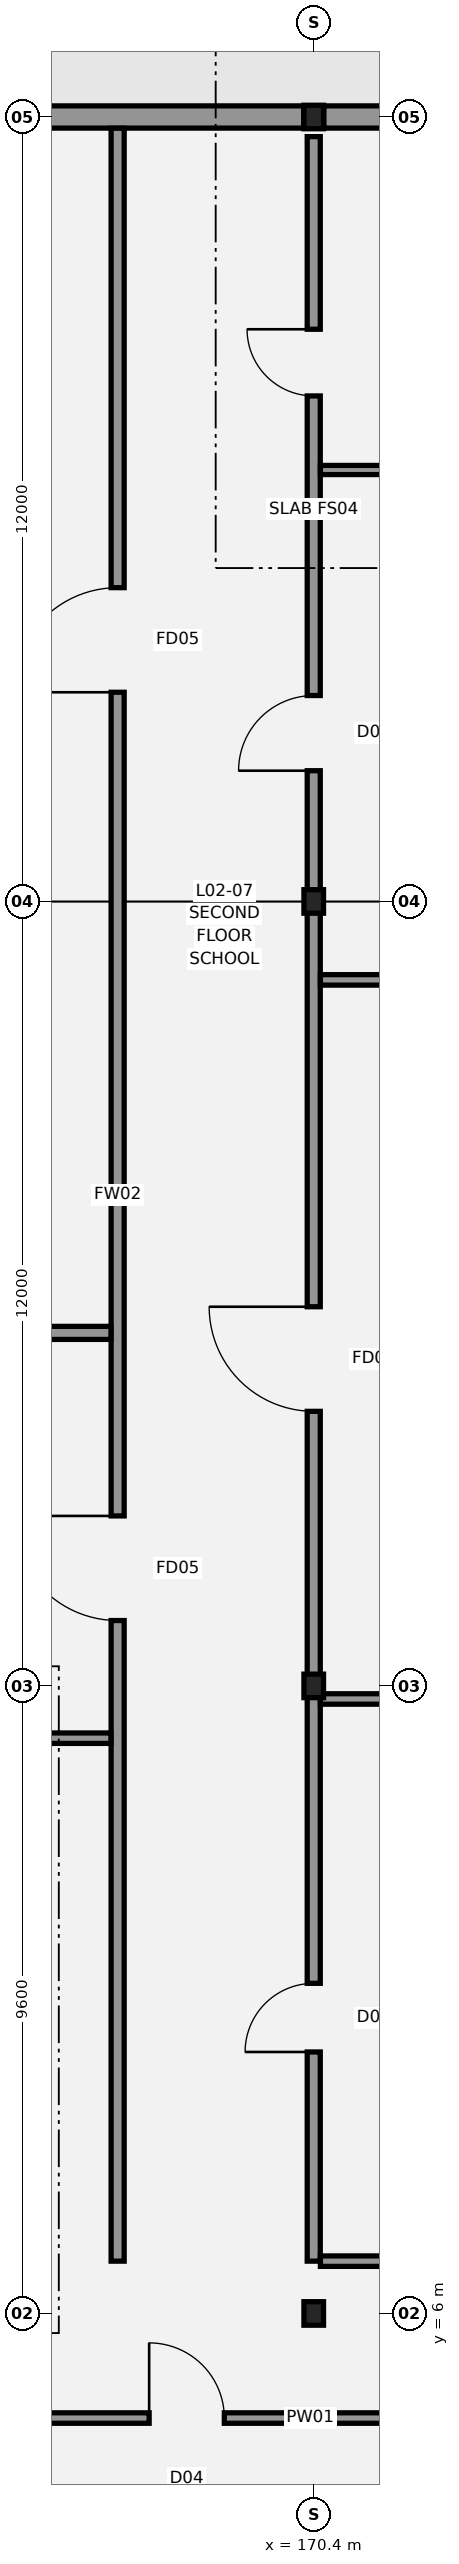
"""IFC4 building model, lengths in metres.
Left out: names, types, materials, properties, quantities, classifications, styles, units other than length and angle.
Written with IfcOpenShell. Run it as: python <this file> out.ifc"""

import sys

from ifc_helpers import new_model, si_unit, direction, frame, frame_2d, origin, origin_2d, place, context, subcontext, project, spatial, rectangle, i_section, extrude, element, fill, save


model = new_model("IFC4")
c1 = context("Model", 3, precision=1e-05, world=origin(), true_north=direction((0.0, 1.0)))
c2 = subcontext(c1, "Body", "Model", "MODEL_VIEW")
j1 = project(units=[si_unit("LENGTHUNIT", "METRE"), si_unit("PLANEANGLEUNIT", "RADIAN")], contexts=[c1])
p1 = place(None, origin())
s1 = spatial("IfcSite", under=j1, at=p1, CompositionType="ELEMENT")
p2 = place(p1, origin())
s2 = spatial("IfcBuilding", under=s1, at=p2, CompositionType="ELEMENT")
p3 = place(p2, frame((0.0, 0.0, 10.2)))
s3 = spatial("IfcBuildingStorey", under=s2, at=p3, CompositionType="ELEMENT", Elevation=10.2)
for number, where, z_axis, x_axis in (
    (1, (170.4, 6.0, 0.0), (0.0, 0.0, 1.0), (1.0, 0.0, 0.0)),
    (2, (170.4, 15.6, 0.0), (0.0, 0.0, 1.0), (1.0, 0.0, 0.0)),
    (3, (170.4, 27.6, 0.0), (0.0, 0.0, 1.0), (1.0, 0.0, 0.0)),
    (4, (170.4, 39.6, 0.0), (0.0, 0.0, 1.0), (1.0, 0.0, 0.0)),
):
    element("IfcColumn", number, at=place(p3, frame(where, z_axis=z_axis, x_axis=x_axis)), inside=s3, PredefinedType="COLUMN", context=c2, shape_type="SweptSolid", body=[
        extrude(i_section(OverallWidth=0.3, OverallDepth=0.36, WebThickness=0.012, FlangeThickness=0.022, FilletRadius=0.027, at=origin_2d()), origin(), (0.0, 0.0, 1.0), 4.2),
    ])
p4 = place(p3, frame((159.754, 39.6, 0.0), z_axis=(0.0, 0.0, 1.0), x_axis=(1.0, 0.0, 0.0)))
e5 = element("IfcWall", 5, at=p4, inside=s3, PredefinedType="STANDARD", context=c2, shape_type="SweptSolid", body=[
    extrude(rectangle(XDim=10.492, YDim=0.34, at=frame_2d((5.246, 0.0))), origin(), (0.0, 0.0, 1.0), 3.445),
])
p5 = place(p4, frame((3.4, 0.0, 0.8)))
e6 = element("IfcOpeningElement", 6, at=p5, cuts=e5, PredefinedType="OPENING", context=c2, shape_type="SweptSolid", body=[
    extrude(rectangle(XDim=2.0, YDim=1.6, at=frame_2d((1.0, 0.8))), frame((0.0, 0.18, 0.0), z_axis=(0.0, -1.0, 0.0), x_axis=(1.0, 0.0, 0.0)), (0.0, 0.0, 1.0), 0.36),
])
p6 = place(p3, frame((170.554, 39.6, 0.0), z_axis=(0.0, 0.0, 1.0), x_axis=(1.0, 0.0, 0.0)))
e7 = element("IfcWall", 7, at=p6, inside=s3, PredefinedType="STANDARD", context=c2, shape_type="SweptSolid", body=[
    extrude(rectangle(XDim=10.492, YDim=0.34, at=frame_2d((5.246, 0.0))), origin(), (0.0, 0.0, 1.0), 3.445),
])
p7 = place(p6, frame((2.0, 0.0, 0.8)))
e8 = element("IfcOpeningElement", 8, at=p7, cuts=e7, PredefinedType="OPENING", context=c2, shape_type="SweptSolid", body=[
    extrude(rectangle(XDim=1.95, YDim=1.75, at=frame_2d((0.975, 0.875))), frame((0.0, 0.18, 0.0), z_axis=(0.0, -1.0, 0.0), x_axis=(1.0, 0.0, 0.0)), (0.0, 0.0, 1.0), 0.36),
])
p8 = place(p3, frame((148.882, 4.4, 0.0), z_axis=(0.0, 0.0, 1.0), x_axis=(1.0, 0.0, 0.0)))
e9 = element("IfcWall", 9, at=p8, inside=s3, PredefinedType="PARTITIONING", context=c2, shape_type="SweptSolid", body=[
    extrude(rectangle(XDim=42.926, YDim=0.16, at=frame_2d((21.463, 0.0))), origin(), (0.0, 0.0, 1.0), 3.58),
])
p9 = place(p8, frame((19.0, 0.0, 0.0)))
e10 = element("IfcOpeningElement", 10, at=p9, cuts=e9, PredefinedType="OPENING", context=c2, shape_type="SweptSolid", body=[
    extrude(rectangle(XDim=1.15, YDim=2.15, at=frame_2d((0.575, 1.075))), frame((0.0, 0.09, 0.0), z_axis=(0.0, -1.0, 0.0), x_axis=(1.0, 0.0, 0.0)), (0.0, 0.0, 1.0), 0.18),
])
p10 = place(p3, frame((167.4, 6.8, 0.0), z_axis=(0.0, 0.0, 1.0), x_axis=(0.0, 1.0, 0.0)))
e11 = element("IfcWall", 11, at=p10, inside=s3, PredefinedType="PARTITIONING", context=c2, shape_type="SweptSolid", body=[
    extrude(rectangle(XDim=32.628, YDim=0.2, at=frame_2d((16.314, 0.0))), origin(), (0.0, 0.0, 1.0), 3.58),
])
p11 = place(p10, frame((9.8, 0.0, 0.0)))
e12 = element("IfcOpeningElement", 12, at=p11, cuts=e11, PredefinedType="OPENING", context=c2, shape_type="SweptSolid", body=[
    extrude(rectangle(XDim=1.6, YDim=2.2, at=frame_2d((0.8, 1.1))), frame((0.0, 0.11, 0.0), z_axis=(0.0, -1.0, 0.0), x_axis=(1.0, 0.0, 0.0)), (0.0, 0.0, 1.0), 0.22),
])
p12 = place(p10, frame((24.0, 0.0, 0.0)))
e13 = element("IfcOpeningElement", 13, at=p12, cuts=e11, PredefinedType="OPENING", context=c2, shape_type="SweptSolid", body=[
    extrude(rectangle(XDim=1.6, YDim=2.2, at=frame_2d((0.8, 1.1))), frame((0.0, 0.11, 0.0), z_axis=(0.0, -1.0, 0.0), x_axis=(1.0, 0.0, 0.0)), (0.0, 0.0, 1.0), 0.22),
])
p13 = place(p3, frame((165.552, 14.8, 0.0), z_axis=(0.0, 0.0, 1.0), x_axis=(1.0, 0.0, 0.0)))
e14 = element("IfcWall", 14, at=p13, inside=s3, PredefinedType="PARTITIONING", context=c2, shape_type="SweptSolid", body=[
    extrude(rectangle(XDim=1.746, YDim=0.16, at=frame_2d((0.873, 0.0))), origin(), (0.0, 0.0, 1.0), 3.58),
])
p14 = place(p3, frame((148.972, 21.0, 0.0), z_axis=(0.0, 0.0, 1.0), x_axis=(1.0, 0.0, 0.0)))
e15 = element("IfcWall", 15, at=p14, inside=s3, PredefinedType="PARTITIONING", context=c2, shape_type="SweptSolid", body=[
    extrude(rectangle(XDim=18.326, YDim=0.2, at=frame_2d((9.163, 0.0))), origin(), (0.0, 0.0, 1.0), 3.58),
])
p15 = place(p3, frame((170.4, 6.8, 0.0), z_axis=(0.0, 0.0, 1.0), x_axis=(0.0, 1.0, 0.0)))
e16 = element("IfcWall", 16, at=p15, inside=s3, PredefinedType="PARTITIONING", context=c2, shape_type="SweptSolid", body=[
    extrude(rectangle(XDim=32.5, YDim=0.2, at=frame_2d((16.25, 0.0))), origin(), (0.0, 0.0, 1.0), 3.58),
])
p16 = place(p15, frame((3.2, 0.0, 0.0)))
e17 = element("IfcOpeningElement", 17, at=p16, cuts=e16, PredefinedType="OPENING", context=c2, shape_type="SweptSolid", body=[
    extrude(rectangle(XDim=1.05, YDim=2.15, at=frame_2d((0.525, 1.075))), frame((0.0, 0.11, 0.0), z_axis=(0.0, -1.0, 0.0), x_axis=(1.0, 0.0, 0.0)), (0.0, 0.0, 1.0), 0.22),
])
p17 = place(p15, frame((13.0, 0.0, 0.0)))
e18 = element("IfcOpeningElement", 18, at=p17, cuts=e16, PredefinedType="OPENING", context=c2, shape_type="SweptSolid", body=[
    extrude(rectangle(XDim=1.6, YDim=2.2, at=frame_2d((0.8, 1.1))), frame((0.0, 0.11, 0.0), z_axis=(0.0, -1.0, 0.0), x_axis=(1.0, 0.0, 0.0)), (0.0, 0.0, 1.0), 0.22),
])
p18 = place(p15, frame((22.8, 0.0, 0.0)))
e19 = element("IfcOpeningElement", 19, at=p18, cuts=e16, PredefinedType="OPENING", context=c2, shape_type="SweptSolid", body=[
    extrude(rectangle(XDim=1.15, YDim=2.15, at=frame_2d((0.575, 1.075))), frame((0.0, 0.11, 0.0), z_axis=(0.0, -1.0, 0.0), x_axis=(1.0, 0.0, 0.0)), (0.0, 0.0, 1.0), 0.22),
])
p19 = place(p15, frame((28.533, 0.0, 0.0)))
e20 = element("IfcOpeningElement", 20, at=p19, cuts=e16, PredefinedType="OPENING", context=c2, shape_type="SweptSolid", body=[
    extrude(rectangle(XDim=1.02, YDim=2.12, at=frame_2d((0.51, 1.06))), frame((0.0, 0.11, 0.0), z_axis=(0.0, -1.0, 0.0), x_axis=(1.0, 0.0, 0.0)), (0.0, 0.0, 1.0), 0.22),
])
p20 = place(p3, frame((170.502, 6.8, 0.0), z_axis=(0.0, 0.0, 1.0), x_axis=(1.0, 0.0, 0.0)))
e21 = element("IfcWall", 21, at=p20, inside=s3, PredefinedType="PARTITIONING", context=c2, shape_type="SweptSolid", body=[
    extrude(rectangle(XDim=12.746, YDim=0.16, at=frame_2d((6.373, 0.0))), origin(), (0.0, 0.0, 1.0), 3.58),
])
p21 = place(p3, frame((170.502, 15.4, 0.0), z_axis=(0.0, 0.0, 1.0), x_axis=(1.0, 0.0, 0.0)))
e22 = element("IfcWall", 22, at=p21, inside=s3, PredefinedType="PARTITIONING", context=c2, shape_type="SweptSolid", body=[
    extrude(rectangle(XDim=21.198, YDim=0.16, at=frame_2d((10.599, 0.0))), origin(), (0.0, 0.0, 1.0), 3.445),
])
p22 = place(p3, frame((170.502, 26.4, 0.0), z_axis=(0.0, 0.0, 1.0), x_axis=(1.0, 0.0, 0.0)))
e23 = element("IfcWall", 23, at=p22, inside=s3, PredefinedType="PARTITIONING", context=c2, shape_type="SweptSolid", body=[
    extrude(rectangle(XDim=21.306, YDim=0.16, at=frame_2d((10.653, 0.0))), origin(), (0.0, 0.0, 1.0), 3.58),
])
p23 = place(p3, frame((170.502, 34.2, 0.0), z_axis=(0.0, 0.0, 1.0), x_axis=(1.0, 0.0, 0.0)))
e24 = element("IfcWall", 24, at=p23, inside=s3, PredefinedType="PARTITIONING", context=c2, shape_type="SweptSolid", body=[
    extrude(rectangle(XDim=21.306, YDim=0.14, at=frame_2d((10.653, 0.0))), origin(), (0.0, 0.0, 1.0), 3.58),
])
p24 = place(p23, frame((8.2, 0.0, 0.0)))
e25 = element("IfcOpeningElement", 25, at=p24, cuts=e24, PredefinedType="OPENING", context=c2, shape_type="SweptSolid", body=[
    extrude(rectangle(XDim=0.95, YDim=2.1, at=frame_2d((0.475, 1.05))), frame((0.0, 0.08, 0.0), z_axis=(0.0, -1.0, 0.0), x_axis=(1.0, 0.0, 0.0)), (0.0, 0.0, 1.0), 0.16),
])
p25 = place(p23, frame((15.6, 0.0, 0.0)))
e26 = element("IfcOpeningElement", 26, at=p25, cuts=e24, PredefinedType="OPENING", context=c2, shape_type="SweptSolid", body=[
    extrude(rectangle(XDim=1.0, YDim=2.1, at=frame_2d((0.5, 1.05))), frame((0.0, 0.08, 0.0), z_axis=(0.0, -1.0, 0.0), x_axis=(1.0, 0.0, 0.0)), (0.0, 0.0, 1.0), 0.16),
])
p26 = place(p9, origin())
e27 = element("IfcDoor", 27, at=p26, inside=s3, OperationType="SINGLE_SWING_LEFT", PredefinedType="DOOR", context=c2, shape_type="SweptSolid", body=[
    extrude(rectangle(XDim=1.15, YDim=2.15, at=frame_2d((0.575, 1.075))), frame((0.0, 0.025, 0.0), z_axis=(0.0, -1.0, 0.0), x_axis=(1.0, 0.0, 0.0)), (0.0, 0.0, 1.0), 0.05),
])
fill(e10, e27)
p27 = place(p11, origin())
e28 = element("IfcDoor", 28, at=p27, inside=s3, OperationType="SINGLE_SWING_RIGHT", PredefinedType="DOOR", context=c2, shape_type="SweptSolid", body=[
    extrude(rectangle(XDim=1.6, YDim=2.2, at=frame_2d((0.8, 1.1))), frame((0.0, 0.025, 0.0), z_axis=(0.0, -1.0, 0.0), x_axis=(1.0, 0.0, 0.0)), (0.0, 0.0, 1.0), 0.05),
])
fill(e12, e28)
p28 = place(p12, origin())
e29 = element("IfcDoor", 29, at=p28, inside=s3, OperationType="SINGLE_SWING_LEFT", PredefinedType="DOOR", context=c2, shape_type="SweptSolid", body=[
    extrude(rectangle(XDim=1.6, YDim=2.2, at=frame_2d((0.8, 1.1))), frame((0.0, 0.025, 0.0), z_axis=(0.0, -1.0, 0.0), x_axis=(1.0, 0.0, 0.0)), (0.0, 0.0, 1.0), 0.05),
])
fill(e13, e29)
p29 = place(p16, origin())
e30 = element("IfcDoor", 30, at=p29, inside=s3, OperationType="SINGLE_SWING_LEFT", PredefinedType="DOOR", context=c2, shape_type="SweptSolid", body=[
    extrude(rectangle(XDim=1.05, YDim=2.15, at=frame_2d((0.525, 1.075))), frame((0.0, 0.025, 0.0), z_axis=(0.0, -1.0, 0.0), x_axis=(1.0, 0.0, 0.0)), (0.0, 0.0, 1.0), 0.05),
])
fill(e17, e30)
p30 = place(p17, origin())
e31 = element("IfcDoor", 31, at=p30, inside=s3, OperationType="SINGLE_SWING_RIGHT", PredefinedType="DOOR", context=c2, shape_type="SweptSolid", body=[
    extrude(rectangle(XDim=1.6, YDim=2.2, at=frame_2d((0.8, 1.1))), frame((0.0, 0.025, 0.0), z_axis=(0.0, -1.0, 0.0), x_axis=(1.0, 0.0, 0.0)), (0.0, 0.0, 1.0), 0.05),
])
fill(e18, e31)
p31 = place(p18, origin())
e32 = element("IfcDoor", 32, at=p31, inside=s3, OperationType="SINGLE_SWING_LEFT", PredefinedType="DOOR", context=c2, shape_type="SweptSolid", body=[
    extrude(rectangle(XDim=1.15, YDim=2.15, at=frame_2d((0.575, 1.075))), frame((0.0, 0.025, 0.0), z_axis=(0.0, -1.0, 0.0), x_axis=(1.0, 0.0, 0.0)), (0.0, 0.0, 1.0), 0.05),
])
fill(e19, e32)
p32 = place(p19, origin())
e33 = element("IfcDoor", 33, at=p32, inside=s3, OperationType="SINGLE_SWING_RIGHT", PredefinedType="DOOR", context=c2, shape_type="SweptSolid", body=[
    extrude(rectangle(XDim=1.02, YDim=2.12, at=frame_2d((0.51, 1.06))), frame((0.0, 0.025, 0.0), z_axis=(0.0, -1.0, 0.0), x_axis=(1.0, 0.0, 0.0)), (0.0, 0.0, 1.0), 0.05),
])
fill(e20, e33)
save(model, sys.argv[1])
